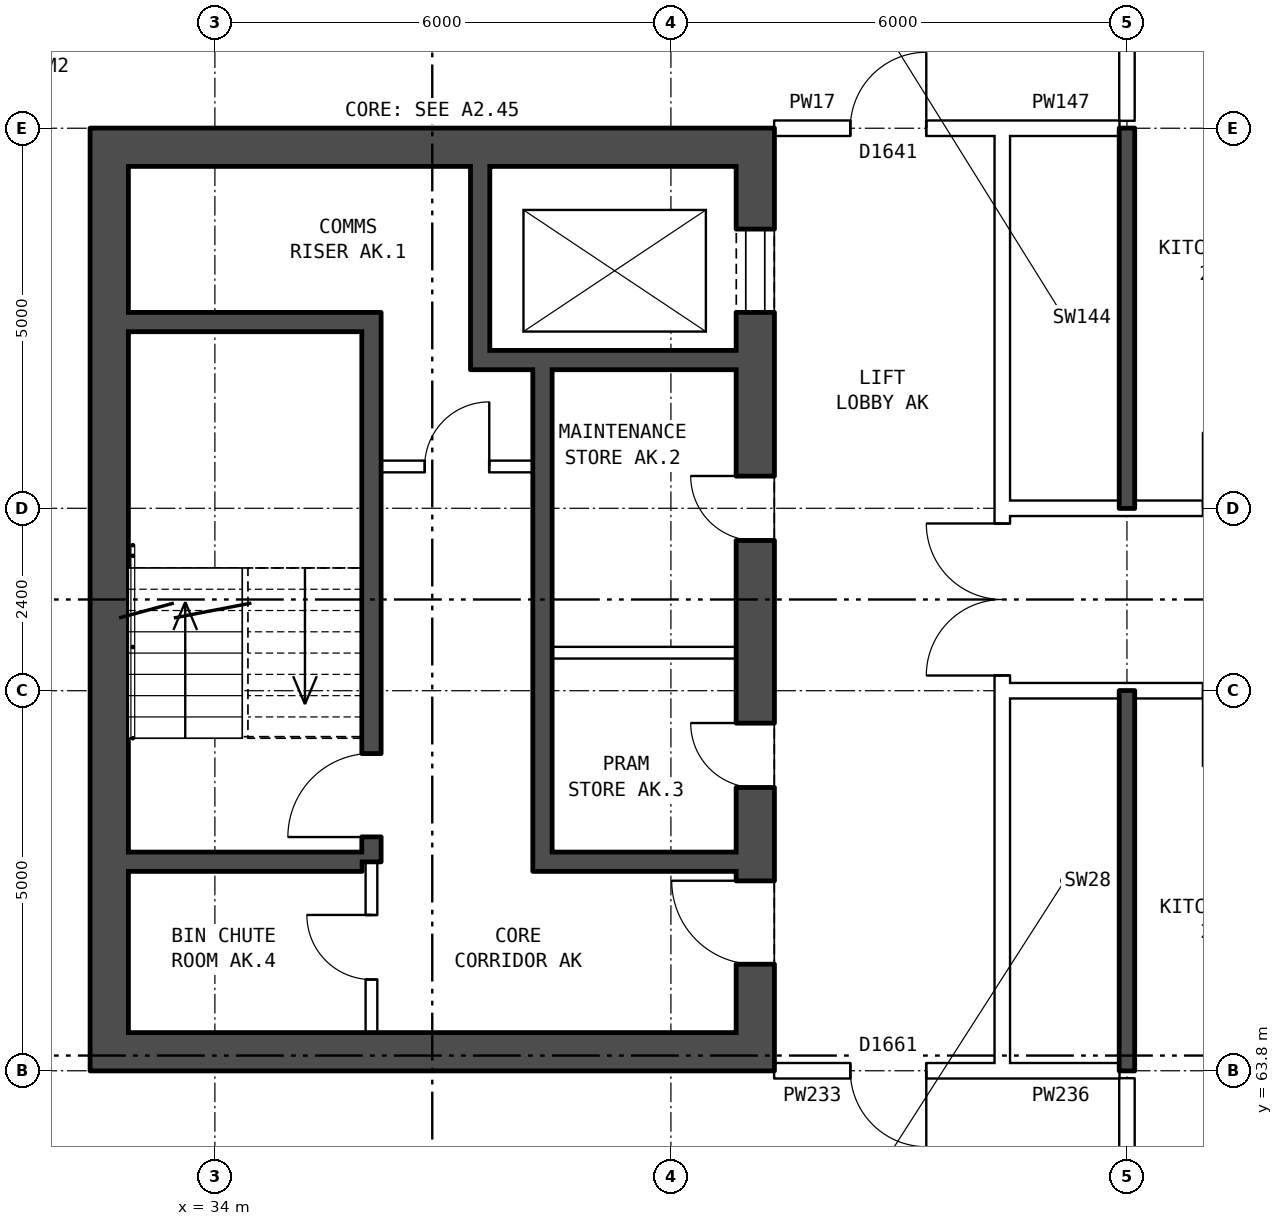
"""IFC4 building model, lengths in metres.
Left out: names, types, materials, properties, quantities, classifications, styles, units other than length and angle.
Written with IfcOpenShell. Run it as: python <this file> out.ifc"""

import sys

from ifc_helpers import new_model, si_unit, direction, frame, frame_2d, origin, place, context, subcontext, project, spatial, rectangle, extrude, element, fill, save


model = new_model("IFC4")
c1 = context("Model", 3, precision=1e-05, world=origin(), true_north=direction((0.0, 1.0)))
c2 = subcontext(c1, "Body", "Model", "MODEL_VIEW")
j1 = project(units=[si_unit("LENGTHUNIT", "METRE"), si_unit("PLANEANGLEUNIT", "RADIAN")], contexts=[c1])
p1 = place(None, origin())
s1 = spatial("IfcSite", under=j1, at=p1, CompositionType="ELEMENT")
p2 = place(p1, origin())
s2 = spatial("IfcBuilding", under=s1, at=p2, CompositionType="ELEMENT")
p3 = place(p2, frame((0.0, 0.0, 157.8)))
s3 = spatial("IfcBuildingStorey", under=s2, at=p3, CompositionType="ELEMENT", Elevation=157.8)
p4 = place(p3, frame((41.11, 76.2, 0.0), z_axis=(0.0, 0.0, 1.0), x_axis=(0.0, -1.0, 0.0)))
e1 = element("IfcWall", 1, at=p4, inside=s3, PredefinedType="SHEAR", context=c2, shape_type="SweptSolid", body=[
    extrude(rectangle(XDim=12.4, YDim=0.5, at=frame_2d((6.2, 0.0))), origin(), (0.0, 0.0, 1.0), 2.85),
])
p5 = place(p4, frame((1.325, 0.0, 0.0)))
e2 = element("IfcOpeningElement", 2, at=p5, cuts=e1, PredefinedType="OPENING", context=c2, shape_type="SweptSolid", body=[
    extrude(rectangle(XDim=1.1, YDim=2.1, at=frame_2d((0.55, 1.05))), frame((0.0, 0.26, 0.0), z_axis=(0.0, -1.0, 0.0), x_axis=(1.0, 0.0, 0.0)), (0.0, 0.0, 1.0), 0.52),
])
p6 = place(p4, frame((4.575, 0.0, 0.0)))
e3 = element("IfcOpeningElement", 3, at=p6, cuts=e1, PredefinedType="OPENING", context=c2, shape_type="SweptSolid", body=[
    extrude(rectangle(XDim=0.85, YDim=2.1, at=frame_2d((0.425, 1.05))), frame((0.0, 0.26, 0.0), z_axis=(0.0, -1.0, 0.0), x_axis=(1.0, 0.0, 0.0)), (0.0, 0.0, 1.0), 0.52),
])
p7 = place(p4, frame((7.825, 0.0, 0.0)))
e4 = element("IfcOpeningElement", 4, at=p7, cuts=e1, PredefinedType="OPENING", context=c2, shape_type="SweptSolid", body=[
    extrude(rectangle(XDim=0.85, YDim=2.1, at=frame_2d((0.425, 1.05))), frame((0.0, 0.26, 0.0), z_axis=(0.0, -1.0, 0.0), x_axis=(1.0, 0.0, 0.0)), (0.0, 0.0, 1.0), 0.52),
])
p8 = place(p4, frame((9.9, 0.0, 0.0)))
e5 = element("IfcOpeningElement", 5, at=p8, cuts=e1, PredefinedType="OPENING", context=c2, shape_type="SweptSolid", body=[
    extrude(rectangle(XDim=1.1, YDim=2.1, at=frame_2d((0.55, 1.05))), frame((0.0, 0.26, 0.0), z_axis=(0.0, -1.0, 0.0), x_axis=(1.0, 0.0, 0.0)), (0.0, 0.0, 1.0), 0.52),
])
p9 = place(p3, frame((32.61, 76.2, 0.0), z_axis=(0.0, 0.0, 1.0), x_axis=(0.0, -1.0, 0.0)))
e6 = element("IfcWall", 6, at=p9, inside=s3, PredefinedType="SHEAR", context=c2, shape_type="SweptSolid", body=[
    extrude(rectangle(XDim=12.4, YDim=0.5, at=frame_2d((6.2, 0.0))), origin(), (0.0, 0.0, 1.0), 2.85),
])
for number, where, z_axis, x_axis in (
    (7, (40.86, 75.95, 0.0), (0.0, 0.0, 1.0), (-1.0, 0.0, 0.0)),
    (8, (40.86, 64.05, 0.0), (0.0, 0.0, 1.0), (-1.0, 0.0, 0.0)),
):
    element("IfcWall", number, at=place(p3, frame(where, z_axis=z_axis, x_axis=x_axis)), inside=s3, PredefinedType="SHEAR", context=c2, shape_type="SweptSolid", body=[
        extrude(rectangle(XDim=8.0, YDim=0.5, at=frame_2d((4.0, 0.0))), origin(), (0.0, 0.0, 1.0), 2.85),
    ])
p10 = place(p3, frame((35.935, 73.65, 0.0), z_axis=(0.0, 0.0, 1.0), x_axis=(-1.0, 0.0, 0.0)))
e9 = element("IfcWall", 9, at=p10, inside=s3, PredefinedType="SHEAR", context=c2, shape_type="SweptSolid", body=[
    extrude(rectangle(XDim=3.075, YDim=0.25, at=frame_2d((1.538, 0.0))), origin(), (0.0, 0.0, 1.0), 2.85),
])
p11 = place(p3, frame((40.86, 73.15, 0.0), z_axis=(0.0, 0.0, 1.0), x_axis=(-1.0, 0.0, 0.0)))
e10 = element("IfcWall", 10, at=p11, inside=s3, PredefinedType="SHEAR", context=c2, shape_type="SweptSolid", body=[
    extrude(rectangle(XDim=3.495, YDim=0.25, at=frame_2d((1.748, 0.0))), origin(), (0.0, 0.0, 1.0), 2.85),
])
p12 = place(p3, frame((38.185, 71.75, 0.0), z_axis=(0.0, 0.0, 1.0), x_axis=(-1.0, 0.0, 0.0)))
e11 = element("IfcWall", 11, at=p12, inside=s3, PredefinedType="PARTITIONING", context=c2, shape_type="SweptSolid", body=[
    extrude(rectangle(XDim=2.0, YDim=0.15, at=frame_2d((1.0, 0.0))), origin(), (0.0, 0.0, 1.0), 2.85),
])
p13 = place(p12, frame((0.575, 0.0, 0.0)))
e12 = element("IfcOpeningElement", 12, at=p13, cuts=e11, PredefinedType="OPENING", context=c2, shape_type="SweptSolid", body=[
    extrude(rectangle(XDim=0.85, YDim=2.1, at=frame_2d((0.425, 1.05))), frame((0.0, 0.085, 0.0), z_axis=(0.0, -1.0, 0.0), x_axis=(1.0, 0.0, 0.0)), (0.0, 0.0, 1.0), 0.17),
])
p14 = place(p3, frame((40.86, 69.3, 0.0), z_axis=(0.0, 0.0, 1.0), x_axis=(-1.0, 0.0, 0.0)))
e13 = element("IfcWall", 13, at=p14, inside=s3, PredefinedType="PARTITIONING", context=c2, shape_type="SweptSolid", body=[
    extrude(rectangle(XDim=2.425, YDim=0.15, at=frame_2d((1.212, 0.0))), origin(), (0.0, 0.0, 1.0), 2.85),
])
p15 = place(p3, frame((40.86, 66.55, 0.0), z_axis=(0.0, 0.0, 1.0), x_axis=(-1.0, 0.0, 0.0)))
e14 = element("IfcWall", 14, at=p15, inside=s3, PredefinedType="SHEAR", context=c2, shape_type="SweptSolid", body=[
    extrude(rectangle(XDim=2.425, YDim=0.25, at=frame_2d((1.212, 0.0))), origin(), (0.0, 0.0, 1.0), 2.85),
])
p16 = place(p3, frame((35.935, 66.55, 0.0), z_axis=(0.0, 0.0, 1.0), x_axis=(-1.0, 0.0, 0.0)))
e15 = element("IfcWall", 15, at=p16, inside=s3, PredefinedType="SHEAR", context=c2, shape_type="SweptSolid", body=[
    extrude(rectangle(XDim=3.075, YDim=0.25, at=frame_2d((1.538, 0.0))), origin(), (0.0, 0.0, 1.0), 2.85),
])
p17 = place(p3, frame((38.31, 73.025, 0.0), z_axis=(0.0, 0.0, 1.0), x_axis=(0.0, -1.0, 0.0)))
e16 = element("IfcWall", 16, at=p17, inside=s3, PredefinedType="SHEAR", context=c2, shape_type="SweptSolid", body=[
    extrude(rectangle(XDim=6.6, YDim=0.25, at=frame_2d((3.3, 0.0))), origin(), (0.0, 0.0, 1.0), 2.85),
])
p18 = place(p3, frame((37.49, 75.7, 0.0), z_axis=(0.0, 0.0, 1.0), x_axis=(0.0, -1.0, 0.0)))
e17 = element("IfcWall", 17, at=p18, inside=s3, PredefinedType="SHEAR", context=c2, shape_type="SweptSolid", body=[
    extrude(rectangle(XDim=2.425, YDim=0.25, at=frame_2d((1.212, 0.0))), origin(), (0.0, 0.0, 1.0), 2.85),
])
p19 = place(p3, frame((36.06, 73.775, 0.0), z_axis=(0.0, 0.0, 1.0), x_axis=(0.0, -1.0, 0.0)))
e18 = element("IfcWall", 18, at=p19, inside=s3, PredefinedType="SHEAR", context=c2, shape_type="SweptSolid", body=[
    extrude(rectangle(XDim=7.225, YDim=0.25, at=frame_2d((3.612, 0.0))), origin(), (0.0, 0.0, 1.0), 2.85),
])
p20 = place(p19, frame((5.8, 0.0, 0.0)))
e19 = element("IfcOpeningElement", 19, at=p20, cuts=e18, PredefinedType="OPENING", context=c2, shape_type="SweptSolid", body=[
    extrude(rectangle(XDim=1.1, YDim=2.1, at=frame_2d((0.55, 1.05))), frame((0.0, 0.135, 0.0), z_axis=(0.0, -1.0, 0.0), x_axis=(1.0, 0.0, 0.0)), (0.0, 0.0, 1.0), 0.27),
])
p21 = place(p3, frame((36.06, 66.55, 0.0), z_axis=(0.0, 0.0, 1.0), x_axis=(0.0, -1.0, 0.0)))
e20 = element("IfcWall", 20, at=p21, inside=s3, PredefinedType="PARTITIONING", context=c2, shape_type="SweptSolid", body=[
    extrude(rectangle(XDim=2.25, YDim=0.15, at=frame_2d((1.125, 0.0))), origin(), (0.0, 0.0, 1.0), 2.85),
])
p22 = place(p21, frame((0.7, 0.0, 0.0)))
e21 = element("IfcOpeningElement", 21, at=p22, cuts=e20, PredefinedType="OPENING", context=c2, shape_type="SweptSolid", body=[
    extrude(rectangle(XDim=0.85, YDim=2.1, at=frame_2d((0.425, 1.05))), frame((0.0, 0.085, 0.0), z_axis=(0.0, -1.0, 0.0), x_axis=(1.0, 0.0, 0.0)), (0.0, 0.0, 1.0), 0.17),
])
p23 = place(p3, frame((44.36, 63.9, 0.0), z_axis=(0.0, 0.0, 1.0), x_axis=(0.0, 1.0, 0.0)))
e22 = element("IfcWall", 22, at=p23, inside=s3, PredefinedType="PARTITIONING", context=c2, shape_type="SweptSolid", body=[
    extrude(rectangle(XDim=12.2, YDim=0.2, at=frame_2d((6.1, 0.0))), origin(), (0.0, 0.0, 1.0), 2.85),
])
p24 = place(p23, frame((5.1, 0.0, 0.0)))
e23 = element("IfcOpeningElement", 23, at=p24, cuts=e22, PredefinedType="OPENING", context=c2, shape_type="SweptSolid", body=[
    extrude(rectangle(XDim=2.0, YDim=2.1, at=frame_2d((1.0, 1.05))), frame((0.0, 0.11, 0.0), z_axis=(0.0, -1.0, 0.0), x_axis=(1.0, 0.0, 0.0)), (0.0, 0.0, 1.0), 0.22),
])
p25 = place(p3, frame((41.36, 63.8, 0.0), z_axis=(0.0, 0.0, 1.0), x_axis=(1.0, 0.0, 0.0)))
e24 = element("IfcWall", 24, at=p25, inside=s3, PredefinedType="PARTITIONING", context=c2, shape_type="SweptSolid", body=[
    extrude(rectangle(XDim=3.0, YDim=0.2, at=frame_2d((1.5, 0.0))), origin(), (0.0, 0.0, 1.0), 2.85),
])
p26 = place(p25, frame((1.0, 0.0, 0.0)))
e25 = element("IfcOpeningElement", 25, at=p26, cuts=e24, PredefinedType="OPENING", context=c2, shape_type="SweptSolid", body=[
    extrude(rectangle(XDim=1.0, YDim=2.1, at=frame_2d((0.5, 1.05))), frame((0.0, 0.11, 0.0), z_axis=(0.0, -1.0, 0.0), x_axis=(1.0, 0.0, 0.0)), (0.0, 0.0, 1.0), 0.22),
])
p27 = place(p3, frame((44.36, 63.8, 0.0), z_axis=(0.0, 0.0, 1.0), x_axis=(1.0, 0.0, 0.0)))
e26 = element("IfcWall", 26, at=p27, inside=s3, PredefinedType="PARTITIONING", context=c2, shape_type="SweptSolid", body=[
    extrude(rectangle(XDim=1.54, YDim=0.2, at=frame_2d((0.77, 0.0))), origin(), (0.0, 0.0, 1.0), 2.85),
])
p28 = place(p3, frame((44.36, 68.8, 0.0), z_axis=(0.0, 0.0, 1.0), x_axis=(1.0, 0.0, 0.0)))
e27 = element("IfcWall", 27, at=p28, inside=s3, PredefinedType="PARTITIONING", context=c2, shape_type="SweptSolid", body=[
    extrude(rectangle(XDim=19.28, YDim=0.2, at=frame_2d((9.64, 0.0))), origin(), (0.0, 0.0, 1.0), 2.85),
])
p29 = place(p28, frame((17.46, 0.0, 0.0)))
e28 = element("IfcOpeningElement", 28, at=p29, cuts=e27, PredefinedType="OPENING", context=c2, shape_type="SweptSolid", body=[
    extrude(rectangle(XDim=1.0, YDim=2.1, at=frame_2d((0.5, 1.05))), frame((0.0, 0.11, 0.0), z_axis=(0.0, -1.0, 0.0), x_axis=(1.0, 0.0, 0.0)), (0.0, 0.0, 1.0), 0.22),
])
p30 = place(p28, frame((8.64, 0.0, 0.0)))
e29 = element("IfcOpeningElement", 29, at=p30, cuts=e27, PredefinedType="OPENING", context=c2, shape_type="SweptSolid", body=[
    extrude(rectangle(XDim=1.0, YDim=2.1, at=frame_2d((0.5, 1.05))), frame((0.0, 0.11, 0.0), z_axis=(0.0, -1.0, 0.0), x_axis=(1.0, 0.0, 0.0)), (0.0, 0.0, 1.0), 0.22),
])
p31 = place(p28, frame((2.64, 0.0, 0.0)))
e30 = element("IfcOpeningElement", 30, at=p31, cuts=e27, PredefinedType="OPENING", context=c2, shape_type="SweptSolid", body=[
    extrude(rectangle(XDim=1.0, YDim=2.1, at=frame_2d((0.5, 1.05))), frame((0.0, 0.11, 0.0), z_axis=(0.0, -1.0, 0.0), x_axis=(1.0, 0.0, 0.0)), (0.0, 0.0, 1.0), 0.22),
])
p32 = place(p3, frame((44.36, 71.2, 0.0), z_axis=(0.0, 0.0, 1.0), x_axis=(1.0, 0.0, 0.0)))
e31 = element("IfcWall", 31, at=p32, inside=s3, PredefinedType="PARTITIONING", context=c2, shape_type="SweptSolid", body=[
    extrude(rectangle(XDim=19.28, YDim=0.2, at=frame_2d((9.64, 0.0))), origin(), (0.0, 0.0, 1.0), 2.85),
])
p33 = place(p32, frame((17.46, 0.0, 0.0)))
e32 = element("IfcOpeningElement", 32, at=p33, cuts=e31, PredefinedType="OPENING", context=c2, shape_type="SweptSolid", body=[
    extrude(rectangle(XDim=1.0, YDim=2.1, at=frame_2d((0.5, 1.05))), frame((0.0, 0.11, 0.0), z_axis=(0.0, -1.0, 0.0), x_axis=(1.0, 0.0, 0.0)), (0.0, 0.0, 1.0), 0.22),
])
p34 = place(p32, frame((8.64, 0.0, 0.0)))
e33 = element("IfcOpeningElement", 33, at=p34, cuts=e31, PredefinedType="OPENING", context=c2, shape_type="SweptSolid", body=[
    extrude(rectangle(XDim=1.0, YDim=2.1, at=frame_2d((0.5, 1.05))), frame((0.0, 0.11, 0.0), z_axis=(0.0, -1.0, 0.0), x_axis=(1.0, 0.0, 0.0)), (0.0, 0.0, 1.0), 0.22),
])
p35 = place(p32, frame((2.64, 0.0, 0.0)))
e34 = element("IfcOpeningElement", 34, at=p35, cuts=e31, PredefinedType="OPENING", context=c2, shape_type="SweptSolid", body=[
    extrude(rectangle(XDim=1.0, YDim=2.1, at=frame_2d((0.5, 1.05))), frame((0.0, 0.11, 0.0), z_axis=(0.0, -1.0, 0.0), x_axis=(1.0, 0.0, 0.0)), (0.0, 0.0, 1.0), 0.22),
])
p36 = place(p3, frame((41.36, 76.2, 0.0), z_axis=(0.0, 0.0, 1.0), x_axis=(1.0, 0.0, 0.0)))
e35 = element("IfcWall", 35, at=p36, inside=s3, PredefinedType="PARTITIONING", context=c2, shape_type="SweptSolid", body=[
    extrude(rectangle(XDim=3.0, YDim=0.2, at=frame_2d((1.5, 0.0))), origin(), (0.0, 0.0, 1.0), 2.85),
])
p37 = place(p36, frame((1.0, 0.0, 0.0)))
e36 = element("IfcOpeningElement", 36, at=p37, cuts=e35, PredefinedType="OPENING", context=c2, shape_type="SweptSolid", body=[
    extrude(rectangle(XDim=1.0, YDim=2.1, at=frame_2d((0.5, 1.05))), frame((0.0, 0.11, 0.0), z_axis=(0.0, -1.0, 0.0), x_axis=(1.0, 0.0, 0.0)), (0.0, 0.0, 1.0), 0.22),
])
p38 = place(p3, frame((44.36, 76.2, 0.0), z_axis=(0.0, 0.0, 1.0), x_axis=(1.0, 0.0, 0.0)))
e37 = element("IfcWall", 37, at=p38, inside=s3, PredefinedType="PARTITIONING", context=c2, shape_type="SweptSolid", body=[
    extrude(rectangle(XDim=1.54, YDim=0.2, at=frame_2d((0.77, 0.0))), origin(), (0.0, 0.0, 1.0), 2.85),
])
p39 = place(p3, frame((46.0, 61.5, 0.0), z_axis=(0.0, 0.0, 1.0), x_axis=(0.0, 1.0, 0.0)))
e38 = element("IfcWall", 38, at=p39, inside=s3, PredefinedType="PARTITIONING", context=c2, shape_type="SweptSolid", body=[
    extrude(rectangle(XDim=2.2, YDim=0.2, at=frame_2d((1.1, 0.0))), origin(), (0.0, 0.0, 1.0), 2.85),
])
for number, where, z_axis, x_axis in (
    (39, (46.0, 63.8, 0.0), (0.0, 0.0, 1.0), (0.0, 1.0, 0.0)),
    (40, (46.0, 71.2, 0.0), (0.0, 0.0, 1.0), (0.0, 1.0, 0.0)),
):
    element("IfcWall", number, at=place(p3, frame(where, z_axis=z_axis, x_axis=x_axis)), inside=s3, PredefinedType="SOLIDWALL", context=c2, shape_type="SweptSolid", body=[
        extrude(rectangle(XDim=5.0, YDim=0.2, at=frame_2d((2.5, 0.0))), origin(), (0.0, 0.0, 1.0), 2.85),
    ])
p40 = place(p3, frame((46.0, 76.3, 0.0), z_axis=(0.0, 0.0, 1.0), x_axis=(0.0, 1.0, 0.0)))
e41 = element("IfcWall", 41, at=p40, inside=s3, PredefinedType="PARTITIONING", context=c2, shape_type="SweptSolid", body=[
    extrude(rectangle(XDim=2.2, YDim=0.2, at=frame_2d((1.1, 0.0))), origin(), (0.0, 0.0, 1.0), 2.85),
])
p41 = place(p5, origin())
e42 = element("IfcDoor", 42, at=p41, inside=s3, OperationType="DOUBLE_DOOR_SLIDING", PredefinedType="DOOR", context=c2, shape_type="SweptSolid", body=[
    extrude(rectangle(XDim=1.1, YDim=2.1, at=frame_2d((0.55, 1.05))), frame((0.0, -0.185, 0.0), z_axis=(0.0, -1.0, 0.0), x_axis=(1.0, 0.0, 0.0)), (0.0, 0.0, 1.0), 0.05),
])
fill(e2, e42)
p42 = place(p6, frame((0.85, 0.0, 0.0), z_axis=(0.0, 0.0, 1.0), x_axis=(-1.0, 0.0, 0.0)))
e43 = element("IfcDoor", 43, at=p42, inside=s3, OperationType="SINGLE_SWING_RIGHT", PredefinedType="DOOR", context=c2, shape_type="SweptSolid", body=[
    extrude(rectangle(XDim=0.85, YDim=2.1, at=frame_2d((0.425, 1.05))), frame((0.0, 0.235, 0.0), z_axis=(0.0, -1.0, 0.0), x_axis=(1.0, 0.0, 0.0)), (0.0, 0.0, 1.0), 0.05),
])
fill(e3, e43)
p43 = place(p7, frame((0.85, 0.0, 0.0), z_axis=(0.0, 0.0, 1.0), x_axis=(-1.0, 0.0, 0.0)))
e44 = element("IfcDoor", 44, at=p43, inside=s3, OperationType="SINGLE_SWING_RIGHT", PredefinedType="DOOR", context=c2, shape_type="SweptSolid", body=[
    extrude(rectangle(XDim=0.85, YDim=2.1, at=frame_2d((0.425, 1.05))), frame((0.0, 0.235, 0.0), z_axis=(0.0, -1.0, 0.0), x_axis=(1.0, 0.0, 0.0)), (0.0, 0.0, 1.0), 0.05),
])
fill(e4, e44)
p44 = place(p8, frame((1.1, 0.0, 0.0), z_axis=(0.0, 0.0, 1.0), x_axis=(-1.0, 0.0, 0.0)))
e45 = element("IfcDoor", 45, at=p44, inside=s3, OperationType="SINGLE_SWING_RIGHT", PredefinedType="DOOR", context=c2, shape_type="SweptSolid", body=[
    extrude(rectangle(XDim=1.1, YDim=2.1, at=frame_2d((0.55, 1.05))), frame((0.0, 0.235, 0.0), z_axis=(0.0, -1.0, 0.0), x_axis=(1.0, 0.0, 0.0)), (0.0, 0.0, 1.0), 0.05),
])
fill(e5, e45)
p45 = place(p20, frame((1.1, 0.0, 0.0), z_axis=(0.0, 0.0, 1.0), x_axis=(-1.0, 0.0, 0.0)))
e46 = element("IfcDoor", 46, at=p45, inside=s3, OperationType="SINGLE_SWING_LEFT", PredefinedType="DOOR", context=c2, shape_type="SweptSolid", body=[
    extrude(rectangle(XDim=1.1, YDim=2.1, at=frame_2d((0.55, 1.05))), frame((0.0, 0.025, 0.0), z_axis=(0.0, -1.0, 0.0), x_axis=(1.0, 0.0, 0.0)), (0.0, 0.0, 1.0), 0.05),
])
fill(e19, e46)
p46 = place(p13, frame((0.85, 0.0, 0.0), z_axis=(0.0, 0.0, 1.0), x_axis=(-1.0, 0.0, 0.0)))
e47 = element("IfcDoor", 47, at=p46, inside=s3, OperationType="SINGLE_SWING_RIGHT", PredefinedType="DOOR", context=c2, shape_type="SweptSolid", body=[
    extrude(rectangle(XDim=0.85, YDim=2.1, at=frame_2d((0.425, 1.05))), frame((0.0, 0.025, 0.0), z_axis=(0.0, -1.0, 0.0), x_axis=(1.0, 0.0, 0.0)), (0.0, 0.0, 1.0), 0.05),
])
fill(e12, e47)
p47 = place(p22, frame((0.85, 0.0, 0.0), z_axis=(0.0, 0.0, 1.0), x_axis=(-1.0, 0.0, 0.0)))
e48 = element("IfcDoor", 48, at=p47, inside=s3, OperationType="SINGLE_SWING_RIGHT", PredefinedType="DOOR", context=c2, shape_type="SweptSolid", body=[
    extrude(rectangle(XDim=0.85, YDim=2.1, at=frame_2d((0.425, 1.05))), frame((0.0, 0.025, 0.0), z_axis=(0.0, -1.0, 0.0), x_axis=(1.0, 0.0, 0.0)), (0.0, 0.0, 1.0), 0.05),
])
fill(e21, e48)
p48 = place(p24, origin())
e49 = element("IfcDoor", 49, at=p48, inside=s3, OperationType="DOUBLE_DOOR_SINGLE_SWING", PredefinedType="DOOR", context=c2, shape_type="SweptSolid", body=[
    extrude(rectangle(XDim=2.0, YDim=2.1, at=frame_2d((1.0, 1.05))), frame((0.0, 0.025, 0.0), z_axis=(0.0, -1.0, 0.0), x_axis=(1.0, 0.0, 0.0)), (0.0, 0.0, 1.0), 0.05),
])
fill(e23, e49)
p49 = place(p26, frame((1.0, 0.0, 0.0), z_axis=(0.0, 0.0, 1.0), x_axis=(-1.0, 0.0, 0.0)))
e50 = element("IfcDoor", 50, at=p49, inside=s3, OperationType="SINGLE_SWING_LEFT", PredefinedType="DOOR", context=c2, shape_type="SweptSolid", body=[
    extrude(rectangle(XDim=1.0, YDim=2.1, at=frame_2d((0.5, 1.05))), frame((0.0, 0.025, 0.0), z_axis=(0.0, -1.0, 0.0), x_axis=(1.0, 0.0, 0.0)), (0.0, 0.0, 1.0), 0.05),
])
fill(e25, e50)
p50 = place(p37, origin())
e51 = element("IfcDoor", 51, at=p50, inside=s3, OperationType="SINGLE_SWING_RIGHT", PredefinedType="DOOR", context=c2, shape_type="SweptSolid", body=[
    extrude(rectangle(XDim=1.0, YDim=2.1, at=frame_2d((0.5, 1.05))), frame((0.0, 0.025, 0.0), z_axis=(0.0, -1.0, 0.0), x_axis=(1.0, 0.0, 0.0)), (0.0, 0.0, 1.0), 0.05),
])
fill(e36, e51)
save(model, sys.argv[1])
